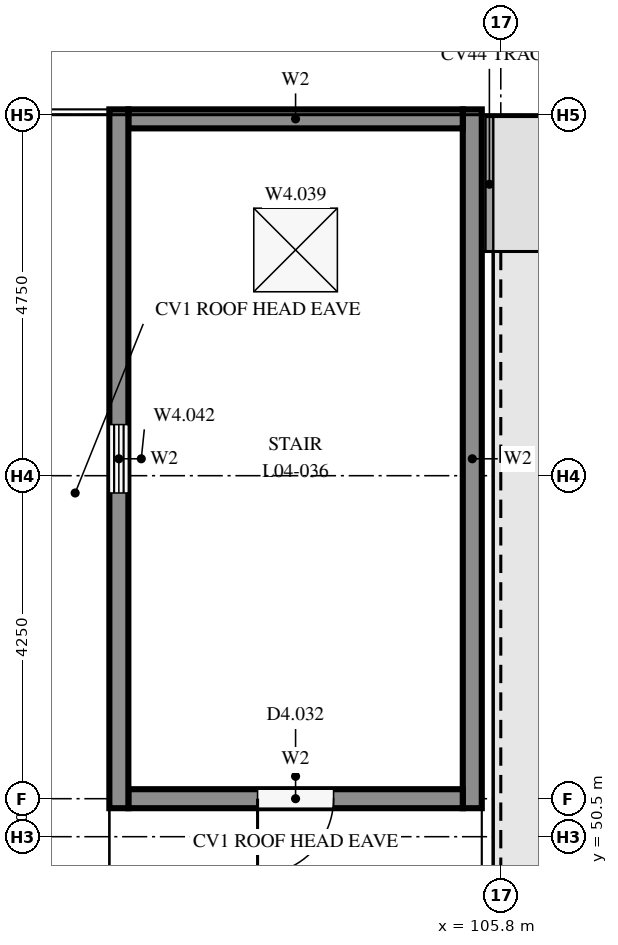
"""IFC4 building model, lengths in metres.
Left out: names, types, materials, properties, quantities, classifications, styles, units other than length and angle.
Written with IfcOpenShell. Run it as: python <this file> out.ifc"""

import sys

from ifc_helpers import new_model, si_unit, direction, frame, frame_2d, origin, origin_2d, place, context, subcontext, project, spatial, rectangle, extrude, element, fill, save


model = new_model("IFC4")
c1 = context("Model", 3, precision=1e-05, world=origin(), true_north=direction((0.0, 1.0)))
c2 = subcontext(c1, "Body", "Model", "MODEL_VIEW")
j1 = project(units=[si_unit("LENGTHUNIT", "METRE"), si_unit("PLANEANGLEUNIT", "RADIAN")], contexts=[c1])
p1 = place(None, origin())
s1 = spatial("IfcSite", under=j1, at=p1, CompositionType="ELEMENT")
p2 = place(p1, origin())
s2 = spatial("IfcBuilding", under=s1, at=p2, CompositionType="ELEMENT")
p3 = place(p2, frame((0.0, 0.0, 15.3)))
s3 = spatial("IfcBuildingStorey", under=s2, at=p3, CompositionType="ELEMENT", Elevation=15.3)
p4 = place(p3, frame((100.775, 50.875, 0.0), z_axis=(0.0, 0.0, 1.0), x_axis=(0.0, 1.0, 0.0)))
e1 = element("IfcWall", 1, at=p4, inside=s3, PredefinedType="SOLIDWALL", context=c2, shape_type="SweptSolid", body=[
    extrude(rectangle(XDim=9.195, YDim=0.25, at=frame_2d((4.598, 0.0))), origin(), (0.0, 0.0, 1.0), 2.45),
])
p5 = place(p4, frame((4.147, 0.0, 0.9)))
e2 = element("IfcOpeningElement", 2, at=p5, cuts=e1, PredefinedType="OPENING", context=c2, shape_type="SweptSolid", body=[
    extrude(rectangle(XDim=0.9, YDim=1.2, at=frame_2d((0.45, 0.6))), frame((0.0, 0.135, 0.0), z_axis=(0.0, -1.0, 0.0), x_axis=(1.0, 0.0, 0.0)), (0.0, 0.0, 1.0), 0.27),
])
p6 = place(p3, frame((105.425, 50.875, 0.0), z_axis=(0.0, 0.0, 1.0), x_axis=(0.0, 1.0, 0.0)))
e3 = element("IfcWall", 3, at=p6, inside=s3, PredefinedType="SOLIDWALL", context=c2, shape_type="SweptSolid", body=[
    extrude(rectangle(XDim=9.195, YDim=0.25, at=frame_2d((4.598, 0.0))), origin(), (0.0, 0.0, 1.0), 2.45),
])
p7 = place(p3, frame((105.3, 51.0, 0.0), z_axis=(0.0, 0.0, 1.0), x_axis=(-1.0, 0.0, 0.0)))
e4 = element("IfcWall", 4, at=p7, inside=s3, PredefinedType="SOLIDWALL", context=c2, shape_type="SweptSolid", body=[
    extrude(rectangle(XDim=4.4, YDim=0.25, at=frame_2d((2.2, 0.0))), origin(), (0.0, 0.0, 1.0), 2.45),
])
p8 = place(p7, frame((1.7, 0.0, 0.0)))
e5 = element("IfcOpeningElement", 5, at=p8, cuts=e4, PredefinedType="OPENING", context=c2, shape_type="SweptSolid", body=[
    extrude(rectangle(XDim=1.0, YDim=2.1, at=frame_2d((0.5, 1.05))), frame((0.0, 0.135, 0.0), z_axis=(0.0, -1.0, 0.0), x_axis=(1.0, 0.0, 0.0)), (0.0, 0.0, 1.0), 0.27),
])
p9 = place(p3, frame((100.9, 59.945, 0.0), z_axis=(0.0, 0.0, 1.0), x_axis=(1.0, 0.0, 0.0)))
e6 = element("IfcWall", 6, at=p9, inside=s3, PredefinedType="SOLIDWALL", context=c2, shape_type="SweptSolid", body=[
    extrude(rectangle(XDim=4.4, YDim=0.25, at=frame_2d((2.2, 0.0))), origin(), (0.0, 0.0, 1.0), 2.45),
])
p10 = place(p3, frame((0.0, 0.0, 2.45)))
p11 = place(p10, frame((103.1, 58.22, 0.0)))
p12 = place(p11, frame((0.0, 0.0, 0.15)))
e7 = element("IfcWindow", 7, at=p12, inside=s3, PartitioningType="SINGLE_PANEL", PredefinedType="SKYLIGHT", context=c2, shape_type="SweptSolid", body=[
    extrude(rectangle(XDim=1.1, YDim=1.1, at=origin_2d()), origin(), (0.0, 0.0, 1.0), 0.05),
])
p13 = place(p8, origin())
e8 = element("IfcDoor", 8, at=p13, inside=s3, OperationType="SINGLE_SWING_RIGHT", PredefinedType="DOOR", context=c2, shape_type="SweptSolid", body=[
    extrude(rectangle(XDim=1.0, YDim=2.1, at=frame_2d((0.5, 1.05))), frame((0.0, 0.025, 0.0), z_axis=(0.0, -1.0, 0.0), x_axis=(1.0, 0.0, 0.0)), (0.0, 0.0, 1.0), 0.05),
])
fill(e5, e8)
p14 = place(p5, origin())
e9 = element("IfcWindow", 9, at=p14, inside=s3, PartitioningType="SINGLE_PANEL", PredefinedType="WINDOW", context=c2, shape_type="SweptSolid", body=[
    extrude(rectangle(XDim=0.9, YDim=1.2, at=frame_2d((0.45, 0.6))), frame((0.0, 0.03, 0.0), z_axis=(0.0, -1.0, 0.0), x_axis=(1.0, 0.0, 0.0)), (0.0, 0.0, 1.0), 0.06),
])
fill(e2, e9)
save(model, sys.argv[1])
